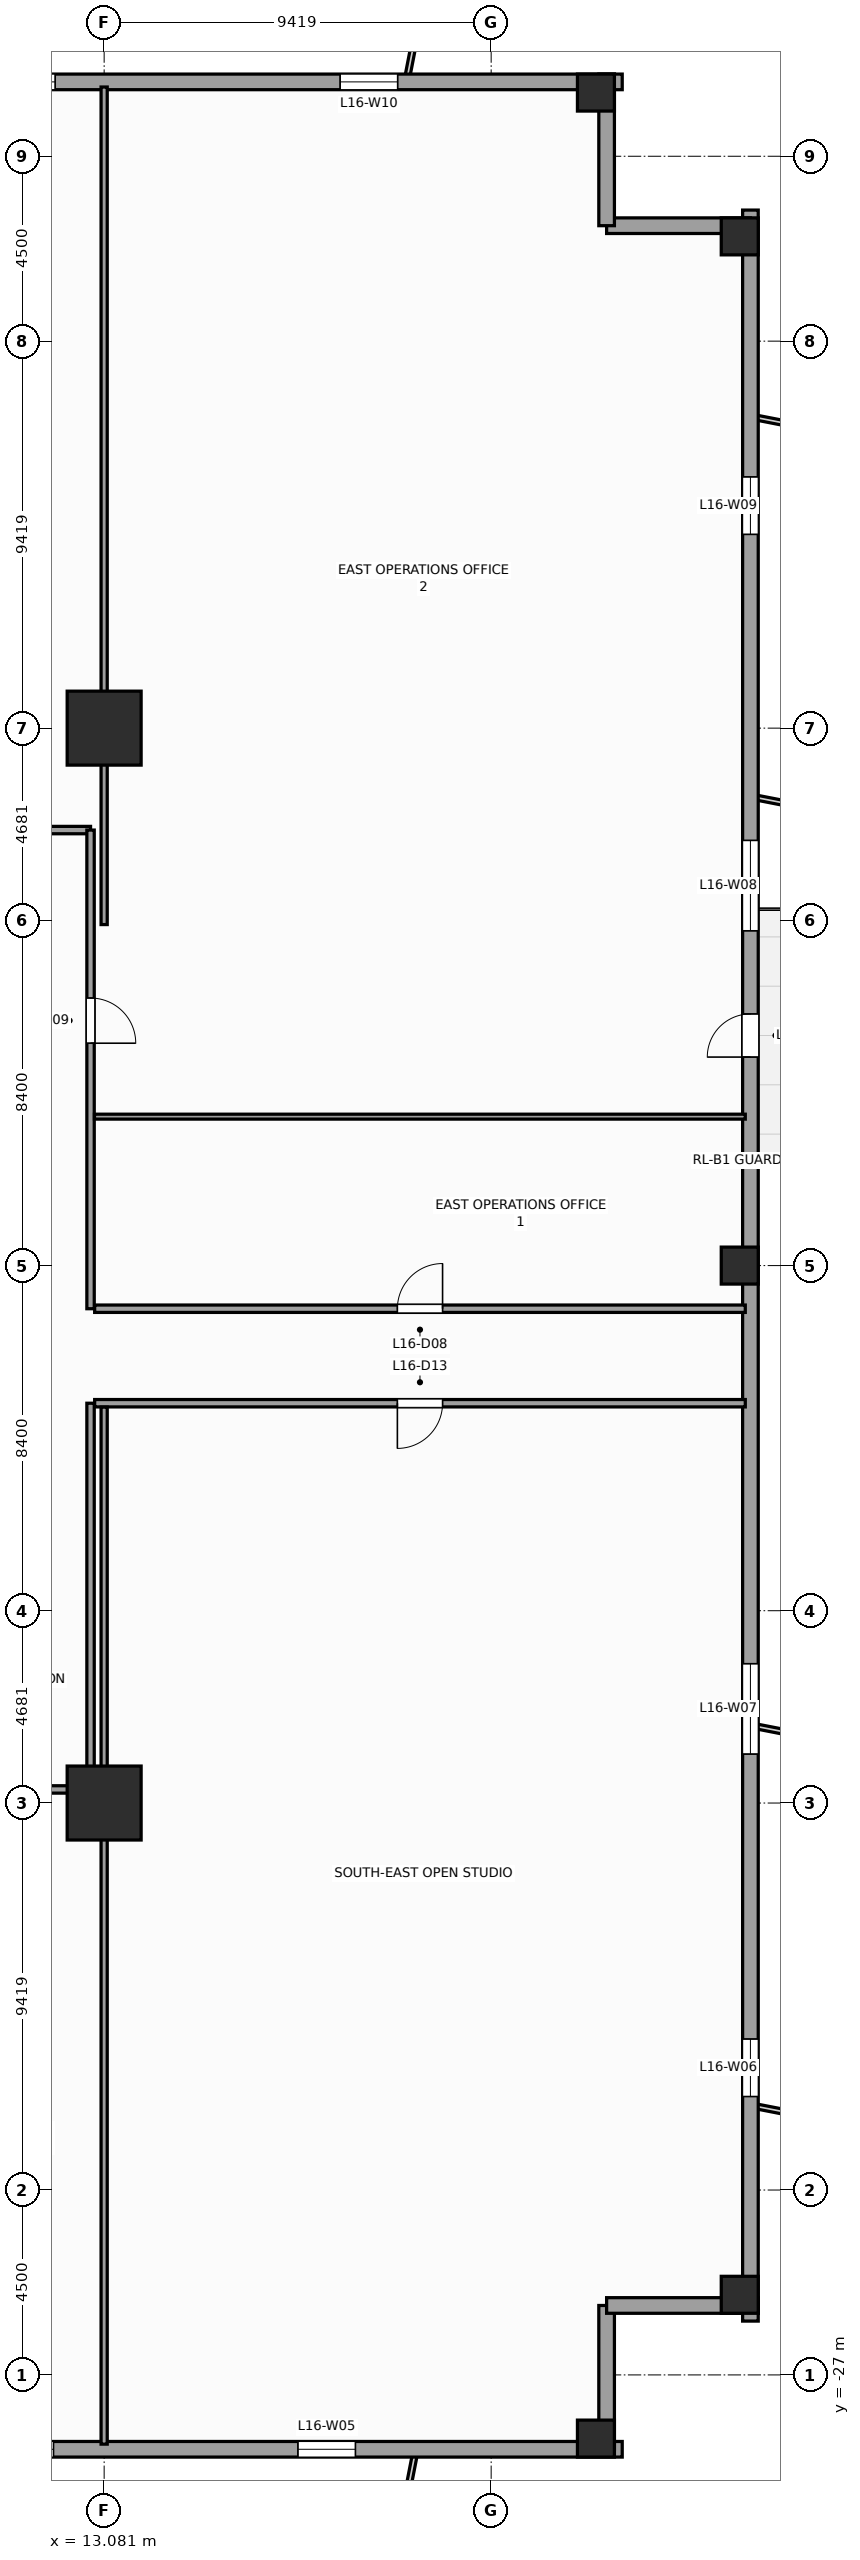
"""IFC4 building model, lengths in metres.
Left out: names, types, materials, properties, quantities, classifications, styles, units other than length and angle.
Written with IfcOpenShell. Run it as: python <this file> out.ifc"""

import sys

from ifc_helpers import new_model, si_unit, direction, frame, frame_2d, origin, origin_2d, place, context, subcontext, project, spatial, rectangle, extrude, source, transform, mapped, element, fill, save


model = new_model("IFC4")
c1 = context("Model", 3, precision=1e-05, world=origin(), true_north=direction((0.0, 1.0)))
c2 = subcontext(c1, "Body", "Model", "MODEL_VIEW")
j1 = project(units=[si_unit("LENGTHUNIT", "METRE"), si_unit("PLANEANGLEUNIT", "RADIAN")], contexts=[c1])
p1 = place(None, origin())
s1 = spatial("IfcSite", under=j1, at=p1, CompositionType="ELEMENT")
p2 = place(p1, origin())
s2 = spatial("IfcBuilding", under=s1, at=p2, CompositionType="ELEMENT")
p3 = place(p2, frame((0.0, 0.0, 70.0)))
s3 = spatial("IfcBuildingStorey", under=s2, at=p3, CompositionType="ELEMENT", Elevation=70.0)
m1 = source(origin(), c2, "Body", "SweptSolid", [
    extrude(rectangle(XDim=1.8, YDim=1.8, at=origin_2d()), origin(), (0.0, 0.0, 1.0), 4.0),
])
for number, where, z_axis, x_axis in (
    (1, (13.081, -13.081, 0.0), (0.0, 0.0, 1.0), (1.0, 0.0, 0.0)),
    (2, (13.081, 13.081, 0.0), (0.0, 0.0, 1.0), (1.0, 0.0, 0.0)),
):
    element("IfcColumn", number, at=place(p3, frame(where, z_axis=z_axis, x_axis=x_axis)), inside=s3, PredefinedType="COLUMN", context=c2, shape_type="MappedRepresentation", body=[
        mapped(m1, transform((0.0, 0.0, 0.0), scale=1.0)),
    ])
m2 = source(origin(), c2, "Body", "SweptSolid", [
    extrude(rectangle(XDim=0.9, YDim=0.9, at=origin_2d()), origin(), (0.0, 0.0, 1.0), 4.0),
])
for number, where, z_axis, x_axis in (
    (3, (25.05, -28.55, 0.0), (0.0, 0.0, 1.0), (1.0, 0.0, 0.0)),
    (4, (28.55, -25.05, 0.0), (0.0, 0.0, 1.0), (1.0, 0.0, 0.0)),
    (5, (28.55, 0.0, 0.0), (0.0, 0.0, 1.0), (1.0, 0.0, 0.0)),
    (6, (28.55, 25.05, 0.0), (0.0, 0.0, 1.0), (1.0, 0.0, 0.0)),
    (7, (25.05, 28.55, 0.0), (0.0, 0.0, 1.0), (1.0, 0.0, 0.0)),
):
    element("IfcColumn", number, at=place(p3, frame(where, z_axis=z_axis, x_axis=x_axis)), inside=s3, PredefinedType="COLUMN", context=c2, shape_type="MappedRepresentation", body=[
        mapped(m2, transform((0.0, 0.0, 0.0), scale=1.0)),
    ])
p4 = place(p3, frame((-25.69, -28.81, 0.0), z_axis=(0.0, 0.0, 1.0), x_axis=(1.0, 0.0, 0.0)))
e8 = element("IfcWall", 8, at=p4, inside=s3, PredefinedType="STANDARD", context=c2, shape_type="SweptSolid", body=[
    extrude(rectangle(XDim=51.38, YDim=0.38, at=frame_2d((25.69, 0.0))), origin(), (0.0, 0.0, 1.0), 3.12),
])
p5 = place(p4, frame((5.466, 0.0, 0.49)))
e9 = element("IfcOpeningElement", 9, at=p5, cuts=e8, PredefinedType="OPENING", context=c2, shape_type="SweptSolid", body=[
    extrude(rectangle(XDim=1.4, YDim=2.4, at=frame_2d((0.7, 1.2))), frame((0.0, 0.2, 0.0), z_axis=(0.0, -1.0, 0.0), x_axis=(1.0, 0.0, 0.0)), (0.0, 0.0, 1.0), 0.4),
])
p6 = place(p4, frame((13.8, 0.0, 0.49)))
e10 = element("IfcOpeningElement", 10, at=p6, cuts=e8, PredefinedType="OPENING", context=c2, shape_type="SweptSolid", body=[
    extrude(rectangle(XDim=2.2, YDim=2.4, at=frame_2d((1.1, 1.2))), frame((0.0, 0.2, 0.0), z_axis=(0.0, -1.0, 0.0), x_axis=(1.0, 0.0, 0.0)), (0.0, 0.0, 1.0), 0.4),
])
p7 = place(p4, frame((22.062, 0.0, 0.49)))
e11 = element("IfcOpeningElement", 11, at=p7, cuts=e8, PredefinedType="OPENING", context=c2, shape_type="SweptSolid", body=[
    extrude(rectangle(XDim=2.2, YDim=2.4, at=frame_2d((1.1, 1.2))), frame((0.0, 0.2, 0.0), z_axis=(0.0, -1.0, 0.0), x_axis=(1.0, 0.0, 0.0)), (0.0, 0.0, 1.0), 0.4),
])
p8 = place(p4, frame((35.338, 0.0, 0.49)))
e12 = element("IfcOpeningElement", 12, at=p8, cuts=e8, PredefinedType="OPENING", context=c2, shape_type="SweptSolid", body=[
    extrude(rectangle(XDim=2.2, YDim=2.4, at=frame_2d((1.1, 1.2))), frame((0.0, 0.2, 0.0), z_axis=(0.0, -1.0, 0.0), x_axis=(1.0, 0.0, 0.0)), (0.0, 0.0, 1.0), 0.4),
])
p9 = place(p4, frame((43.487, 0.0, 0.49)))
e13 = element("IfcOpeningElement", 13, at=p9, cuts=e8, PredefinedType="OPENING", context=c2, shape_type="SweptSolid", body=[
    extrude(rectangle(XDim=1.4, YDim=2.4, at=frame_2d((0.7, 1.2))), frame((0.0, 0.2, 0.0), z_axis=(0.0, -1.0, 0.0), x_axis=(1.0, 0.0, 0.0)), (0.0, 0.0, 1.0), 0.4),
])
p10 = place(p3, frame((25.31, -28.81, 0.0), z_axis=(0.0, 0.0, 1.0), x_axis=(0.0, 1.0, 0.0)))
e14 = element("IfcWall", 14, at=p10, inside=s3, PredefinedType="STANDARD", context=c2, shape_type="SweptSolid", body=[
    extrude(rectangle(XDim=3.5, YDim=0.38, at=frame_2d((1.75, 0.0))), origin(), (0.0, 0.0, 1.0), 3.72),
])
p11 = place(p3, frame((25.31, -25.31, 0.0), z_axis=(0.0, 0.0, 1.0), x_axis=(1.0, 0.0, 0.0)))
e15 = element("IfcWall", 15, at=p11, inside=s3, PredefinedType="STANDARD", context=c2, shape_type="SweptSolid", body=[
    extrude(rectangle(XDim=3.69, YDim=0.38, at=frame_2d((1.845, 0.0))), origin(), (0.0, 0.0, 1.0), 3.72),
])
p12 = place(p3, frame((28.81, -25.69, 0.0), z_axis=(0.0, 0.0, 1.0), x_axis=(0.0, 1.0, 0.0)))
e16 = element("IfcWall", 16, at=p12, inside=s3, PredefinedType="STANDARD", context=c2, shape_type="SweptSolid", body=[
    extrude(rectangle(XDim=51.38, YDim=0.38, at=frame_2d((25.69, 0.0))), origin(), (0.0, 0.0, 1.0), 3.12),
])
p13 = place(p12, frame((30.765, 0.0, 0.0)))
e17 = element("IfcOpeningElement", 17, at=p13, cuts=e16, PredefinedType="OPENING", context=c2, shape_type="SweptSolid", body=[
    extrude(rectangle(XDim=1.05, YDim=2.25, at=frame_2d((0.525, 1.125))), frame((0.0, 0.2, 0.0), z_axis=(0.0, -1.0, 0.0), x_axis=(1.0, 0.0, 0.0)), (0.0, 0.0, 1.0), 0.4),
])
p14 = place(p12, frame((5.466, 0.0, 0.49)))
e18 = element("IfcOpeningElement", 18, at=p14, cuts=e16, PredefinedType="OPENING", context=c2, shape_type="SweptSolid", body=[
    extrude(rectangle(XDim=1.4, YDim=2.4, at=frame_2d((0.7, 1.2))), frame((0.0, 0.2, 0.0), z_axis=(0.0, -1.0, 0.0), x_axis=(1.0, 0.0, 0.0)), (0.0, 0.0, 1.0), 0.4),
])
p15 = place(p12, frame((13.8, 0.0, 0.49)))
e19 = element("IfcOpeningElement", 19, at=p15, cuts=e16, PredefinedType="OPENING", context=c2, shape_type="SweptSolid", body=[
    extrude(rectangle(XDim=2.2, YDim=2.4, at=frame_2d((1.1, 1.2))), frame((0.0, 0.2, 0.0), z_axis=(0.0, -1.0, 0.0), x_axis=(1.0, 0.0, 0.0)), (0.0, 0.0, 1.0), 0.4),
])
p16 = place(p12, frame((33.838, 0.0, 0.49)))
e20 = element("IfcOpeningElement", 20, at=p16, cuts=e16, PredefinedType="OPENING", context=c2, shape_type="SweptSolid", body=[
    extrude(rectangle(XDim=2.2, YDim=2.4, at=frame_2d((1.1, 1.2))), frame((0.0, 0.2, 0.0), z_axis=(0.0, -1.0, 0.0), x_axis=(1.0, 0.0, 0.0)), (0.0, 0.0, 1.0), 0.4),
])
p17 = place(p12, frame((43.487, 0.0, 0.49)))
e21 = element("IfcOpeningElement", 21, at=p17, cuts=e16, PredefinedType="OPENING", context=c2, shape_type="SweptSolid", body=[
    extrude(rectangle(XDim=1.4, YDim=2.4, at=frame_2d((0.7, 1.2))), frame((0.0, 0.2, 0.0), z_axis=(0.0, -1.0, 0.0), x_axis=(1.0, 0.0, 0.0)), (0.0, 0.0, 1.0), 0.4),
])
p18 = place(p3, frame((28.81, 25.31, 0.0), z_axis=(0.0, 0.0, 1.0), x_axis=(-1.0, 0.0, 0.0)))
e22 = element("IfcWall", 22, at=p18, inside=s3, PredefinedType="STANDARD", context=c2, shape_type="SweptSolid", body=[
    extrude(rectangle(XDim=3.5, YDim=0.38, at=frame_2d((1.75, 0.0))), origin(), (0.0, 0.0, 1.0), 3.72),
])
p19 = place(p3, frame((25.31, 25.31, 0.0), z_axis=(0.0, 0.0, 1.0), x_axis=(0.0, 1.0, 0.0)))
e23 = element("IfcWall", 23, at=p19, inside=s3, PredefinedType="STANDARD", context=c2, shape_type="SweptSolid", body=[
    extrude(rectangle(XDim=3.69, YDim=0.38, at=frame_2d((1.845, 0.0))), origin(), (0.0, 0.0, 1.0), 3.72),
])
p20 = place(p3, frame((25.69, 28.81, 0.0), z_axis=(0.0, 0.0, 1.0), x_axis=(-1.0, 0.0, 0.0)))
e24 = element("IfcWall", 24, at=p20, inside=s3, PredefinedType="STANDARD", context=c2, shape_type="SweptSolid", body=[
    extrude(rectangle(XDim=51.38, YDim=0.38, at=frame_2d((25.69, 0.0))), origin(), (0.0, 0.0, 1.0), 3.12),
])
p21 = place(p20, frame((5.466, 0.0, 0.49)))
e25 = element("IfcOpeningElement", 25, at=p21, cuts=e24, PredefinedType="OPENING", context=c2, shape_type="SweptSolid", body=[
    extrude(rectangle(XDim=1.4, YDim=2.4, at=frame_2d((0.7, 1.2))), frame((0.0, 0.2, 0.0), z_axis=(0.0, -1.0, 0.0), x_axis=(1.0, 0.0, 0.0)), (0.0, 0.0, 1.0), 0.4),
])
p22 = place(p20, frame((13.8, 0.0, 0.49)))
e26 = element("IfcOpeningElement", 26, at=p22, cuts=e24, PredefinedType="OPENING", context=c2, shape_type="SweptSolid", body=[
    extrude(rectangle(XDim=2.2, YDim=2.4, at=frame_2d((1.1, 1.2))), frame((0.0, 0.2, 0.0), z_axis=(0.0, -1.0, 0.0), x_axis=(1.0, 0.0, 0.0)), (0.0, 0.0, 1.0), 0.4),
])
p23 = place(p20, frame((22.062, 0.0, 0.49)))
e27 = element("IfcOpeningElement", 27, at=p23, cuts=e24, PredefinedType="OPENING", context=c2, shape_type="SweptSolid", body=[
    extrude(rectangle(XDim=2.2, YDim=2.4, at=frame_2d((1.1, 1.2))), frame((0.0, 0.2, 0.0), z_axis=(0.0, -1.0, 0.0), x_axis=(1.0, 0.0, 0.0)), (0.0, 0.0, 1.0), 0.4),
])
p24 = place(p20, frame((33.838, 0.0, 0.49)))
e28 = element("IfcOpeningElement", 28, at=p24, cuts=e24, PredefinedType="OPENING", context=c2, shape_type="SweptSolid", body=[
    extrude(rectangle(XDim=2.2, YDim=2.4, at=frame_2d((1.1, 1.2))), frame((0.0, 0.2, 0.0), z_axis=(0.0, -1.0, 0.0), x_axis=(1.0, 0.0, 0.0)), (0.0, 0.0, 1.0), 0.4),
])
p25 = place(p20, frame((43.487, 0.0, 0.49)))
e29 = element("IfcOpeningElement", 29, at=p25, cuts=e24, PredefinedType="OPENING", context=c2, shape_type="SweptSolid", body=[
    extrude(rectangle(XDim=1.4, YDim=2.4, at=frame_2d((0.7, 1.2))), frame((0.0, 0.2, 0.0), z_axis=(0.0, -1.0, 0.0), x_axis=(1.0, 0.0, 0.0)), (0.0, 0.0, 1.0), 0.4),
])
p26 = place(p3, frame((-11.7, 10.6, 0.0), z_axis=(0.0, 0.0, 1.0), x_axis=(1.0, 0.0, 0.0)))
e30 = element("IfcWall", 30, at=p26, inside=s3, PredefinedType="PARTITIONING", context=c2, shape_type="SweptSolid", body=[
    extrude(rectangle(XDim=24.45, YDim=0.18, at=frame_2d((12.225, 0.0))), origin(), (0.0, 0.0, 1.0), 3.72),
])
p27 = place(p26, frame((3.714, 0.0, 0.0)))
e31 = element("IfcOpeningElement", 31, at=p27, cuts=e30, PredefinedType="OPENING", context=c2, shape_type="SweptSolid", body=[
    extrude(rectangle(XDim=1.1, YDim=2.2, at=frame_2d((0.55, 1.1))), frame((0.0, 0.1, 0.0), z_axis=(0.0, -1.0, 0.0), x_axis=(1.0, 0.0, 0.0)), (0.0, 0.0, 1.0), 0.2),
])
p28 = place(p26, frame((11.65, 0.0, 0.0)))
e32 = element("IfcOpeningElement", 32, at=p28, cuts=e30, PredefinedType="OPENING", context=c2, shape_type="SweptSolid", body=[
    extrude(rectangle(XDim=1.1, YDim=2.2, at=frame_2d((0.55, 1.1))), frame((0.0, 0.1, 0.0), z_axis=(0.0, -1.0, 0.0), x_axis=(1.0, 0.0, 0.0)), (0.0, 0.0, 1.0), 0.2),
])
p29 = place(p26, frame((19.611, 0.0, 0.0)))
e33 = element("IfcOpeningElement", 33, at=p29, cuts=e30, PredefinedType="OPENING", context=c2, shape_type="SweptSolid", body=[
    extrude(rectangle(XDim=1.1, YDim=2.2, at=frame_2d((0.55, 1.1))), frame((0.0, 0.1, 0.0), z_axis=(0.0, -1.0, 0.0), x_axis=(1.0, 0.0, 0.0)), (0.0, 0.0, 1.0), 0.2),
])
p30 = place(p3, frame((3.35, -12.75, 0.0), z_axis=(0.0, 0.0, 1.0), x_axis=(1.0, 0.0, 0.0)))
e34 = element("IfcWall", 34, at=p30, inside=s3, PredefinedType="PARTITIONING", context=c2, shape_type="SweptSolid", body=[
    extrude(rectangle(XDim=9.4, YDim=0.18, at=frame_2d((4.7, 0.0))), origin(), (0.0, 0.0, 1.0), 3.72),
])
p31 = place(p30, frame((3.45, 0.0, 0.0)))
e35 = element("IfcOpeningElement", 35, at=p31, cuts=e34, PredefinedType="OPENING", context=c2, shape_type="SweptSolid", body=[
    extrude(rectangle(XDim=1.1, YDim=2.2, at=frame_2d((0.55, 1.1))), frame((0.0, 0.1, 0.0), z_axis=(0.0, -1.0, 0.0), x_axis=(1.0, 0.0, 0.0)), (0.0, 0.0, 1.0), 0.2),
])
p32 = place(p30, frame((6.47, 0.0, 0.0)))
e36 = element("IfcOpeningElement", 36, at=p32, cuts=e34, PredefinedType="OPENING", context=c2, shape_type="SweptSolid", body=[
    extrude(rectangle(XDim=1.1, YDim=2.2, at=frame_2d((0.55, 1.1))), frame((0.0, 0.1, 0.0), z_axis=(0.0, -1.0, 0.0), x_axis=(1.0, 0.0, 0.0)), (0.0, 0.0, 1.0), 0.2),
])
p33 = place(p3, frame((12.75, -12.75, 0.0), z_axis=(0.0, 0.0, 1.0), x_axis=(0.0, 1.0, 0.0)))
e37 = element("IfcWall", 37, at=p33, inside=s3, PredefinedType="PARTITIONING", context=c2, shape_type="SweptSolid", body=[
    extrude(rectangle(XDim=9.4, YDim=0.18, at=frame_2d((4.7, 0.0))), origin(), (0.0, 0.0, 1.0), 3.72),
])
p34 = place(p3, frame((12.75, -1.05, 0.0), z_axis=(0.0, 0.0, 1.0), x_axis=(0.0, 1.0, 0.0)))
e38 = element("IfcWall", 38, at=p34, inside=s3, PredefinedType="PARTITIONING", context=c2, shape_type="SweptSolid", body=[
    extrude(rectangle(XDim=11.65, YDim=0.18, at=frame_2d((5.825, 0.0))), origin(), (0.0, 0.0, 1.0), 3.72),
])
p35 = place(p34, frame((6.462, 0.0, 0.0)))
e39 = element("IfcOpeningElement", 39, at=p35, cuts=e38, PredefinedType="OPENING", context=c2, shape_type="SweptSolid", body=[
    extrude(rectangle(XDim=1.1, YDim=2.2, at=frame_2d((0.55, 1.1))), frame((0.0, 0.1, 0.0), z_axis=(0.0, -1.0, 0.0), x_axis=(1.0, 0.0, 0.0)), (0.0, 0.0, 1.0), 0.2),
])
p36 = place(p3, frame((12.85, -3.35, 0.0), z_axis=(0.0, 0.0, 1.0), x_axis=(1.0, 0.0, 0.0)))
e40 = element("IfcWall", 40, at=p36, inside=s3, PredefinedType="PARTITIONING", context=c2, shape_type="SweptSolid", body=[
    extrude(rectangle(XDim=15.835, YDim=0.18, at=frame_2d((7.917, 0.0))), origin(), (0.0, 0.0, 1.0), 3.72),
])
p37 = place(p36, frame((7.367, 0.0, 0.0)))
e41 = element("IfcOpeningElement", 41, at=p37, cuts=e40, PredefinedType="OPENING", context=c2, shape_type="SweptSolid", body=[
    extrude(rectangle(XDim=1.1, YDim=2.2, at=frame_2d((0.55, 1.1))), frame((0.0, 0.1, 0.0), z_axis=(0.0, -1.0, 0.0), x_axis=(1.0, 0.0, 0.0)), (0.0, 0.0, 1.0), 0.2),
])
p38 = place(p3, frame((12.85, -1.05, 0.0), z_axis=(0.0, 0.0, 1.0), x_axis=(1.0, 0.0, 0.0)))
e42 = element("IfcWall", 42, at=p38, inside=s3, PredefinedType="PARTITIONING", context=c2, shape_type="SweptSolid", body=[
    extrude(rectangle(XDim=15.835, YDim=0.18, at=frame_2d((7.917, 0.0))), origin(), (0.0, 0.0, 1.0), 3.72),
])
p39 = place(p38, frame((7.367, 0.0, 0.0)))
e43 = element("IfcOpeningElement", 43, at=p39, cuts=e42, PredefinedType="OPENING", context=c2, shape_type="SweptSolid", body=[
    extrude(rectangle(XDim=1.1, YDim=2.2, at=frame_2d((0.55, 1.1))), frame((0.0, 0.1, 0.0), z_axis=(0.0, -1.0, 0.0), x_axis=(1.0, 0.0, 0.0)), (0.0, 0.0, 1.0), 0.2),
])
p40 = place(p3, frame((13.081, 8.3, 0.0), z_axis=(0.0, 0.0, 1.0), x_axis=(0.0, 1.0, 0.0)))
e44 = element("IfcWall", 44, at=p40, inside=s3, PredefinedType="PARTITIONING", context=c2, shape_type="SweptSolid", body=[
    extrude(rectangle(XDim=20.385, YDim=0.15, at=frame_2d((10.192, 0.0))), origin(), (0.0, 0.0, 1.0), 2.712),
])
p41 = place(p3, frame((12.845, 3.625, 0.0), z_axis=(0.0, 0.0, 1.0), x_axis=(1.0, 0.0, 0.0)))
e45 = element("IfcWall", 45, at=p41, inside=s3, PredefinedType="PARTITIONING", context=c2, shape_type="SweptSolid", body=[
    extrude(rectangle(XDim=15.84, YDim=0.12, at=frame_2d((7.92, 0.0))), origin(), (0.0, 0.0, 1.0), 3.72),
])
p42 = place(p3, frame((13.081, -28.685, 0.0), z_axis=(0.0, 0.0, 1.0), x_axis=(0.0, 1.0, 0.0)))
e46 = element("IfcWall", 46, at=p42, inside=s3, PredefinedType="PARTITIONING", context=c2, shape_type="SweptSolid", body=[
    extrude(rectangle(XDim=25.24, YDim=0.15, at=frame_2d((12.62, 0.0))), origin(), (0.0, 0.0, 1.0), 2.712),
])
m3 = source(origin(), c2, "Body", "SweptSolid", [
    extrude(rectangle(XDim=2.2, YDim=2.4, at=frame_2d((1.1, 1.2))), frame((0.0, 0.03, 0.0), z_axis=(0.0, -1.0, 0.0), x_axis=(1.0, 0.0, 0.0)), (0.0, 0.0, 1.0), 0.06),
])
p43 = place(p8, origin())
e47 = element("IfcWindow", 47, at=p43, inside=s3, PartitioningType="SINGLE_PANEL", PredefinedType="WINDOW", context=c2, shape_type="MappedRepresentation", body=[
    mapped(m3, transform((0.0, 0.0, 0.0), scale=1.0)),
])
fill(e12, e47)
m4 = source(origin(), c2, "Body", "SweptSolid", [
    extrude(rectangle(XDim=1.4, YDim=2.4, at=frame_2d((0.7, 1.2))), frame((0.0, 0.03, 0.0), z_axis=(0.0, -1.0, 0.0), x_axis=(1.0, 0.0, 0.0)), (0.0, 0.0, 1.0), 0.06),
])
p44 = place(p9, origin())
e48 = element("IfcWindow", 48, at=p44, inside=s3, PartitioningType="SINGLE_PANEL", PredefinedType="WINDOW", context=c2, shape_type="MappedRepresentation", body=[
    mapped(m4, transform((0.0, 0.0, 0.0), scale=1.0)),
])
fill(e13, e48)
m5 = source(origin(), c2, "Body", "SweptSolid", [
    extrude(rectangle(XDim=1.05, YDim=2.25, at=frame_2d((0.525, 1.125))), frame((0.0, 0.025, 0.0), z_axis=(0.0, -1.0, 0.0), x_axis=(1.0, 0.0, 0.0)), (0.0, 0.0, 1.0), 0.05),
])
p45 = place(p13, origin())
e49 = element("IfcDoor", 49, at=p45, inside=s3, OperationType="SINGLE_SWING_LEFT", PredefinedType="DOOR", context=c2, shape_type="MappedRepresentation", body=[
    mapped(m5, transform((0.0, 0.0, 0.0), scale=1.0)),
])
fill(e17, e49)
p46 = place(p14, origin())
e50 = element("IfcWindow", 50, at=p46, inside=s3, PartitioningType="SINGLE_PANEL", PredefinedType="WINDOW", context=c2, shape_type="MappedRepresentation", body=[
    mapped(m4, transform((0.0, 0.0, 0.0), scale=1.0)),
])
fill(e18, e50)
p47 = place(p15, origin())
e51 = element("IfcWindow", 51, at=p47, inside=s3, PartitioningType="SINGLE_PANEL", PredefinedType="WINDOW", context=c2, shape_type="MappedRepresentation", body=[
    mapped(m3, transform((0.0, 0.0, 0.0), scale=1.0)),
])
fill(e19, e51)
p48 = place(p16, origin())
e52 = element("IfcWindow", 52, at=p48, inside=s3, PartitioningType="SINGLE_PANEL", PredefinedType="WINDOW", context=c2, shape_type="MappedRepresentation", body=[
    mapped(m3, transform((0.0, 0.0, 0.0), scale=1.0)),
])
fill(e20, e52)
p49 = place(p17, origin())
e53 = element("IfcWindow", 53, at=p49, inside=s3, PartitioningType="SINGLE_PANEL", PredefinedType="WINDOW", context=c2, shape_type="MappedRepresentation", body=[
    mapped(m4, transform((0.0, 0.0, 0.0), scale=1.0)),
])
fill(e21, e53)
p50 = place(p21, origin())
e54 = element("IfcWindow", 54, at=p50, inside=s3, PartitioningType="SINGLE_PANEL", PredefinedType="WINDOW", context=c2, shape_type="MappedRepresentation", body=[
    mapped(m4, transform((0.0, 0.0, 0.0), scale=1.0)),
])
fill(e25, e54)
p51 = place(p22, origin())
e55 = element("IfcWindow", 55, at=p51, inside=s3, PartitioningType="SINGLE_PANEL", PredefinedType="WINDOW", context=c2, shape_type="MappedRepresentation", body=[
    mapped(m3, transform((0.0, 0.0, 0.0), scale=1.0)),
])
fill(e26, e55)
m6 = source(origin(), c2, "Body", "SweptSolid", [
    extrude(rectangle(XDim=1.1, YDim=2.2, at=frame_2d((0.55, 1.1))), frame((0.0, 0.025, 0.0), z_axis=(0.0, -1.0, 0.0), x_axis=(1.0, 0.0, 0.0)), (0.0, 0.0, 1.0), 0.05),
])
p52 = place(p39, origin())
e56 = element("IfcDoor", 56, at=p52, inside=s3, OperationType="SINGLE_SWING_RIGHT", PredefinedType="DOOR", context=c2, shape_type="MappedRepresentation", body=[
    mapped(m6, transform((0.0, 0.0, 0.0), scale=1.0)),
])
fill(e43, e56)
p53 = place(p35, frame((1.1, 0.0, 0.0), z_axis=(0.0, 0.0, 1.0), x_axis=(-1.0, 0.0, 0.0)))
e57 = element("IfcDoor", 57, at=p53, inside=s3, OperationType="SINGLE_SWING_LEFT", PredefinedType="DOOR", context=c2, shape_type="MappedRepresentation", body=[
    mapped(m6, transform((0.0, 0.0, 0.0), scale=1.0)),
])
fill(e39, e57)
p54 = place(p37, frame((1.1, 0.0, 0.0), z_axis=(0.0, 0.0, 1.0), x_axis=(-1.0, 0.0, 0.0)))
e58 = element("IfcDoor", 58, at=p54, inside=s3, OperationType="SINGLE_SWING_LEFT", PredefinedType="DOOR", context=c2, shape_type="MappedRepresentation", body=[
    mapped(m6, transform((0.0, 0.0, 0.0), scale=1.0)),
])
fill(e41, e58)
save(model, sys.argv[1])
